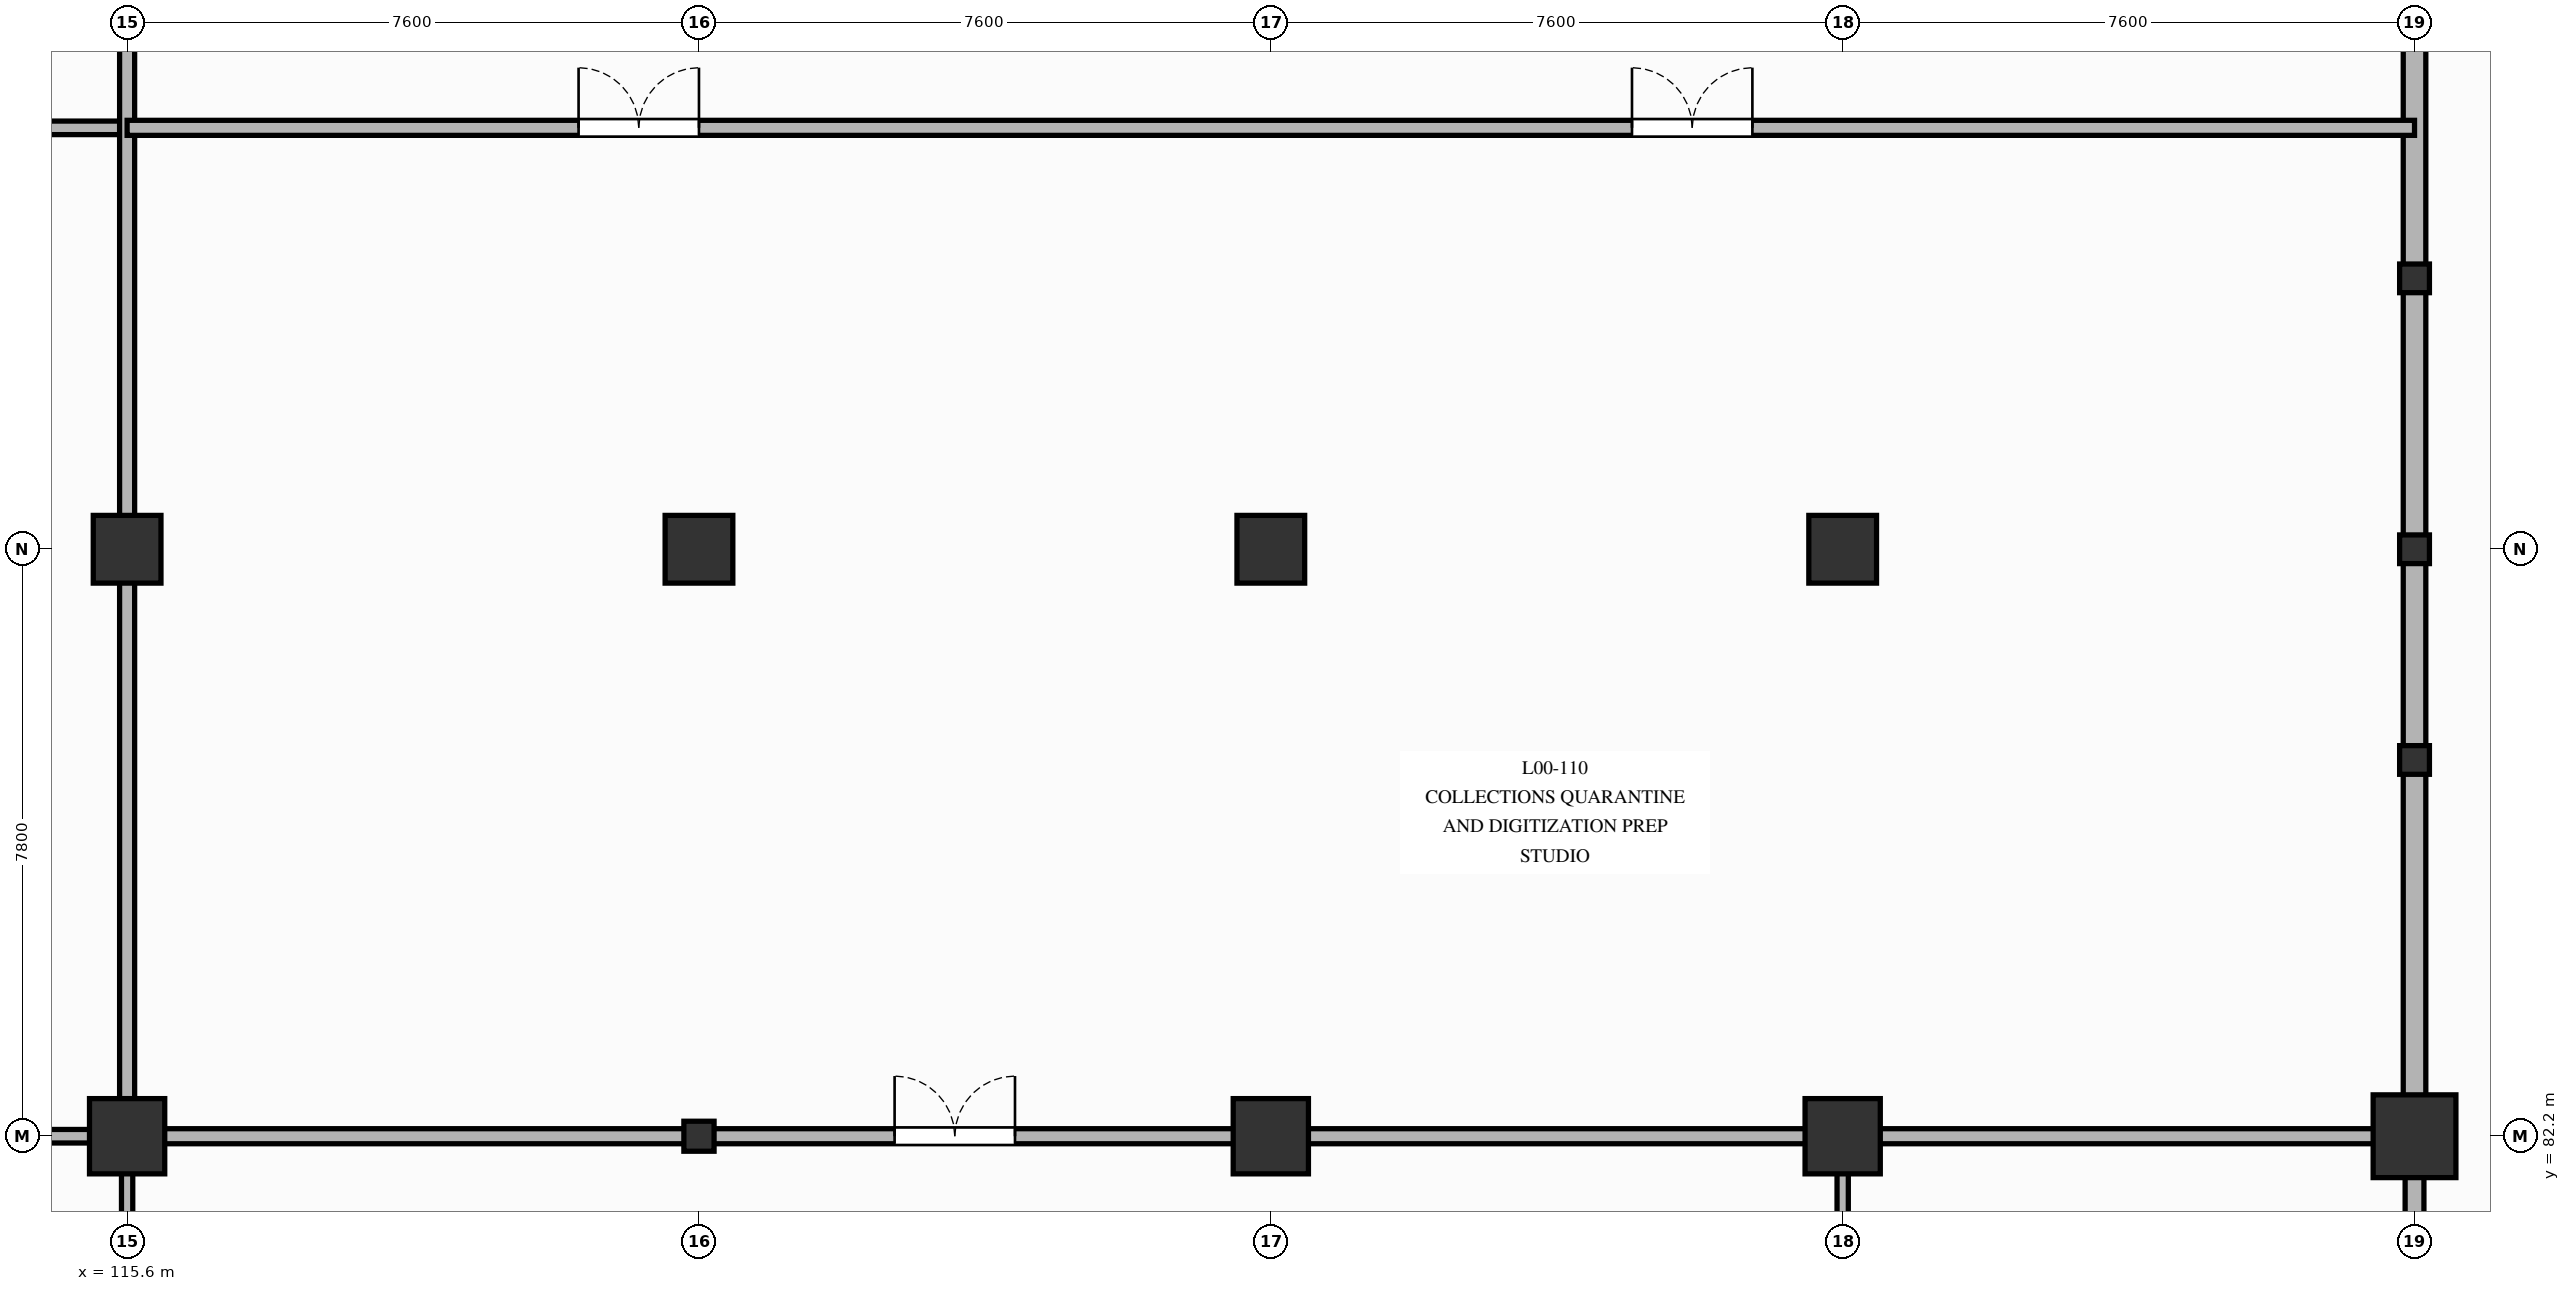
"""IFC4 building model, lengths in metres.
Left out: names, types, materials, properties, quantities, classifications, styles, units other than length and angle.
Written with IfcOpenShell. Run it as: python <this file> out.ifc"""

import sys

from ifc_helpers import new_model, si_unit, direction, frame, frame_2d, origin, origin_2d, place, context, subcontext, project, spatial, rectangle, i_section, extrude, element, fill, save


model = new_model("IFC4")
c1 = context("Model", 3, precision=1e-05, world=origin(), true_north=direction((0.0, 1.0)))
c2 = subcontext(c1, "Body", "Model", "MODEL_VIEW")
j1 = project(units=[si_unit("LENGTHUNIT", "METRE"), si_unit("PLANEANGLEUNIT", "RADIAN")], contexts=[c1])
p1 = place(None, origin())
s1 = spatial("IfcSite", under=j1, at=p1, CompositionType="ELEMENT")
p2 = place(p1, origin())
s2 = spatial("IfcBuilding", under=s1, at=p2, CompositionType="ELEMENT")
p3 = place(p2, origin())
s3 = spatial("IfcBuildingStorey", under=s2, at=p3, CompositionType="ELEMENT", Elevation=0.0)
p4 = place(p3, frame((115.6, 82.2, 0.0), z_axis=(0.0, 0.0, 1.0), x_axis=(1.0, 0.0, 0.0)))
e1 = element("IfcColumn", 1, at=p4, inside=s3, PredefinedType="COLUMN", context=c2, shape_type="SweptSolid", body=[
    extrude(rectangle(XDim=1.0, YDim=1.0, at=origin_2d()), origin(), (0.0, 0.0, 1.0), 5.1),
])
p5 = place(p3, frame((115.6, 90.0, 0.0), z_axis=(0.0, 0.0, 1.0), x_axis=(1.0, 0.0, 0.0)))
e2 = element("IfcColumn", 2, at=p5, inside=s3, PredefinedType="COLUMN", context=c2, shape_type="SweptSolid", body=[
    extrude(rectangle(XDim=0.9, YDim=0.9, at=origin_2d()), origin(), (0.0, 0.0, 1.0), 5.1),
])
p6 = place(p3, frame((123.2, 82.2, 0.0), z_axis=(0.0, 0.0, 1.0), x_axis=(1.0, 0.0, 0.0)))
e3 = element("IfcColumn", 3, at=p6, inside=s3, PredefinedType="COLUMN", context=c2, shape_type="SweptSolid", body=[
    extrude(i_section(OverallWidth=0.401, OverallDepth=0.399, WebThickness=0.025, FlangeThickness=0.04, at=origin_2d()), origin(), (0.0, 0.0, 1.0), 5.1),
])
p7 = place(p3, frame((123.2, 90.0, 0.0), z_axis=(0.0, 0.0, 1.0), x_axis=(1.0, 0.0, 0.0)))
e4 = element("IfcColumn", 4, at=p7, inside=s3, PredefinedType="COLUMN", context=c2, shape_type="SweptSolid", body=[
    extrude(rectangle(XDim=0.9, YDim=0.9, at=origin_2d()), origin(), (0.0, 0.0, 1.0), 5.1),
])
p8 = place(p3, frame((130.8, 82.2, 0.0), z_axis=(0.0, 0.0, 1.0), x_axis=(1.0, 0.0, 0.0)))
e5 = element("IfcColumn", 5, at=p8, inside=s3, PredefinedType="COLUMN", context=c2, shape_type="SweptSolid", body=[
    extrude(rectangle(XDim=1.0, YDim=1.0, at=origin_2d()), origin(), (0.0, 0.0, 1.0), 5.1),
])
p9 = place(p3, frame((130.8, 90.0, 0.0), z_axis=(0.0, 0.0, 1.0), x_axis=(1.0, 0.0, 0.0)))
e6 = element("IfcColumn", 6, at=p9, inside=s3, PredefinedType="COLUMN", context=c2, shape_type="SweptSolid", body=[
    extrude(rectangle(XDim=0.9, YDim=0.9, at=origin_2d()), origin(), (0.0, 0.0, 1.0), 5.1),
])
p10 = place(p3, frame((138.4, 82.2, 0.0), z_axis=(0.0, 0.0, 1.0), x_axis=(1.0, 0.0, 0.0)))
e7 = element("IfcColumn", 7, at=p10, inside=s3, PredefinedType="COLUMN", context=c2, shape_type="SweptSolid", body=[
    extrude(rectangle(XDim=1.0, YDim=1.0, at=origin_2d()), origin(), (0.0, 0.0, 1.0), 5.1),
])
p11 = place(p3, frame((138.4, 90.0, 0.0), z_axis=(0.0, 0.0, 1.0), x_axis=(1.0, 0.0, 0.0)))
e8 = element("IfcColumn", 8, at=p11, inside=s3, PredefinedType="COLUMN", context=c2, shape_type="SweptSolid", body=[
    extrude(rectangle(XDim=0.9, YDim=0.9, at=origin_2d()), origin(), (0.0, 0.0, 1.0), 5.1),
])
p12 = place(p3, frame((146.0, 82.2, 0.0), z_axis=(0.0, 0.0, 1.0), x_axis=(1.0, 0.0, 0.0)))
e9 = element("IfcColumn", 9, at=p12, inside=s3, PredefinedType="COLUMN", context=c2, shape_type="SweptSolid", body=[
    extrude(rectangle(XDim=1.1, YDim=1.1, at=origin_2d()), origin(), (0.0, 0.0, 1.0), 5.1),
])
for number, where, z_axis, x_axis in (
    (10, (146.0, 90.0, 0.0), (0.0, 0.0, 1.0), (1.0, 0.0, 0.0)),
    (11, (146.0, 87.2, 0.0), (0.0, 0.0, 1.0), (1.0, 0.0, 0.0)),
    (12, (146.0, 93.6, 0.0), (0.0, 0.0, 1.0), (1.0, 0.0, 0.0)),
):
    element("IfcColumn", number, at=place(p3, frame(where, z_axis=z_axis, x_axis=x_axis)), inside=s3, PredefinedType="COLUMN", context=c2, shape_type="SweptSolid", body=[
        extrude(i_section(OverallWidth=0.396, OverallDepth=0.381, WebThickness=0.019, FlangeThickness=0.03, at=origin_2d()), origin(), (0.0, 0.0, 1.0), 5.1),
    ])
p13 = place(p3, frame((146.0, 82.2, 0.0), z_axis=(0.0, 0.0, 1.0), x_axis=(0.0, 1.0, 0.0)))
e13 = element("IfcWall", 13, at=p13, inside=s3, PredefinedType="SOLIDWALL", context=c2, shape_type="SweptSolid", body=[
    extrude(rectangle(XDim=31.8, YDim=0.3, at=frame_2d((15.9, 0.0))), origin(), (0.0, 0.0, 1.0), 4.145),
])
p14 = place(p13, frame((24.45, 0.0, 0.0)))
e14 = element("IfcOpeningElement", 14, at=p14, cuts=e13, PredefinedType="OPENING", context=c2, shape_type="SweptSolid", body=[
    extrude(rectangle(XDim=3.2, YDim=3.6, at=frame_2d((1.6, 1.8))), frame((0.0, 0.16, 0.0), z_axis=(0.0, -1.0, 0.0), x_axis=(1.0, 0.0, 0.0)), (0.0, 0.0, 1.0), 0.32),
])
p15 = place(p13, frame((28.0, 0.0, 0.0)))
e15 = element("IfcOpeningElement", 15, at=p15, cuts=e13, PredefinedType="OPENING", context=c2, shape_type="SweptSolid", body=[
    extrude(rectangle(XDim=3.2, YDim=3.6, at=frame_2d((1.6, 1.8))), frame((0.0, 0.16, 0.0), z_axis=(0.0, -1.0, 0.0), x_axis=(1.0, 0.0, 0.0)), (0.0, 0.0, 1.0), 0.32),
])
p16 = place(p3, frame((111.4, 95.6, 0.0), z_axis=(0.0, 0.0, 1.0), x_axis=(1.0, 0.0, 0.0)))
e16 = element("IfcWall", 16, at=p16, inside=s3, PredefinedType="PLUMBINGWALL", context=c2, shape_type="SweptSolid", body=[
    extrude(rectangle(XDim=4.2, YDim=0.18, at=frame_2d((2.1, 0.0))), origin(), (0.0, 0.0, 1.0), 4.8),
])
p17 = place(p16, frame((1.625, 0.0, 0.0)))
e17 = element("IfcOpeningElement", 17, at=p17, cuts=e16, PredefinedType="OPENING", context=c2, shape_type="SweptSolid", body=[
    extrude(rectangle(XDim=0.95, YDim=2.15, at=frame_2d((0.475, 1.075))), frame((0.0, 0.1, 0.0), z_axis=(0.0, -1.0, 0.0), x_axis=(1.0, 0.0, 0.0)), (0.0, 0.0, 1.0), 0.2),
])
p18 = place(p3, frame((115.6, 82.2, 0.0), z_axis=(0.0, 0.0, 1.0), x_axis=(0.0, 1.0, 0.0)))
e18 = element("IfcWall", 18, at=p18, inside=s3, PredefinedType="PARTITIONING", context=c2, shape_type="SweptSolid", body=[
    extrude(rectangle(XDim=31.8, YDim=0.2, at=frame_2d((15.9, 0.0))), origin(), (0.0, 0.0, 1.0), 4.045),
])
p19 = place(p18, frame((18.0, 0.0, 0.0)))
e19 = element("IfcOpeningElement", 19, at=p19, cuts=e18, PredefinedType="OPENING", context=c2, shape_type="SweptSolid", body=[
    extrude(rectangle(XDim=1.6, YDim=2.2, at=frame_2d((0.8, 1.1))), frame((0.0, 0.11, 0.0), z_axis=(0.0, -1.0, 0.0), x_axis=(1.0, 0.0, 0.0)), (0.0, 0.0, 1.0), 0.22),
])
p20 = place(p3, frame((115.6, 95.6, 0.0), z_axis=(0.0, 0.0, 1.0), x_axis=(1.0, 0.0, 0.0)))
e20 = element("IfcWall", 20, at=p20, inside=s3, PredefinedType="PARTITIONING", context=c2, shape_type="SweptSolid", body=[
    extrude(rectangle(XDim=30.4, YDim=0.2, at=frame_2d((15.2, 0.0))), origin(), (0.0, 0.0, 1.0), 4.045),
])
p21 = place(p20, frame((6.0, 0.0, 0.0)))
e21 = element("IfcOpeningElement", 21, at=p21, cuts=e20, PredefinedType="OPENING", context=c2, shape_type="SweptSolid", body=[
    extrude(rectangle(XDim=1.6, YDim=2.2, at=frame_2d((0.8, 1.1))), frame((0.0, 0.11, 0.0), z_axis=(0.0, -1.0, 0.0), x_axis=(1.0, 0.0, 0.0)), (0.0, 0.0, 1.0), 0.22),
])
p22 = place(p20, frame((20.0, 0.0, 0.0)))
e22 = element("IfcOpeningElement", 22, at=p22, cuts=e20, PredefinedType="OPENING", context=c2, shape_type="SweptSolid", body=[
    extrude(rectangle(XDim=1.6, YDim=2.2, at=frame_2d((0.8, 1.1))), frame((0.0, 0.11, 0.0), z_axis=(0.0, -1.0, 0.0), x_axis=(1.0, 0.0, 0.0)), (0.0, 0.0, 1.0), 0.22),
])
for number, where, z_axis, x_axis in (
    (23, (115.6, 66.6, 0.0), (0.0, 0.0, 1.0), (0.0, 1.0, 0.0)),
    (24, (138.4, 66.6, 0.0), (0.0, 0.0, 1.0), (0.0, 1.0, 0.0)),
):
    element("IfcWall", number, at=place(p3, frame(where, z_axis=z_axis, x_axis=x_axis)), inside=s3, PredefinedType="PARTITIONING", context=c2, shape_type="SweptSolid", body=[
        extrude(rectangle(XDim=15.6, YDim=0.15, at=frame_2d((7.8, 0.0))), origin(), (0.0, 0.0, 1.0), 4.163),
    ])
p23 = place(p3, frame((146.0, 74.4, 0.0), z_axis=(0.0, 0.0, 1.0), x_axis=(0.0, 1.0, 0.0)))
e25 = element("IfcWall", 25, at=p23, inside=s3, PredefinedType="PARTITIONING", context=c2, shape_type="SweptSolid", body=[
    extrude(rectangle(XDim=7.8, YDim=0.25, at=frame_2d((3.9, 0.0))), origin(), (0.0, 0.0, 1.0), 4.308),
])
p24 = place(p23, frame((1.2, 0.0, 0.0)))
e26 = element("IfcOpeningElement", 26, at=p24, cuts=e25, PredefinedType="OPENING", context=c2, shape_type="SweptSolid", body=[
    extrude(rectangle(XDim=1.8, YDim=2.3, at=frame_2d((0.9, 1.15))), frame((0.0, 0.135, 0.0), z_axis=(0.0, -1.0, 0.0), x_axis=(1.0, 0.0, 0.0)), (0.0, 0.0, 1.0), 0.27),
])
p25 = place(p23, frame((3.6, 0.0, 0.0)))
e27 = element("IfcOpeningElement", 27, at=p25, cuts=e25, PredefinedType="OPENING", context=c2, shape_type="SweptSolid", body=[
    extrude(rectangle(XDim=1.8, YDim=2.3, at=frame_2d((0.9, 1.15))), frame((0.0, 0.135, 0.0), z_axis=(0.0, -1.0, 0.0), x_axis=(1.0, 0.0, 0.0)), (0.0, 0.0, 1.0), 0.27),
])
p26 = place(p3, frame((99.0, 82.2, 0.0), z_axis=(0.0, 0.0, 1.0), x_axis=(1.0, 0.0, 0.0)))
e28 = element("IfcWall", 28, at=p26, inside=s3, PredefinedType="PLUMBINGWALL", context=c2, shape_type="SweptSolid", body=[
    extrude(rectangle(XDim=16.6, YDim=0.18, at=frame_2d((8.3, 0.0))), origin(), (0.0, 0.0, 1.0), 4.153),
])
p27 = place(p3, frame((115.6, 82.2, 0.0), z_axis=(0.0, 0.0, 1.0), x_axis=(1.0, 0.0, 0.0)))
e29 = element("IfcWall", 29, at=p27, inside=s3, PredefinedType="PARTITIONING", context=c2, shape_type="SweptSolid", body=[
    extrude(rectangle(XDim=30.4, YDim=0.2, at=frame_2d((15.2, 0.0))), origin(), (0.0, 0.0, 1.0), 4.308),
])
p28 = place(p27, frame((10.2, 0.0, 0.0)))
e30 = element("IfcOpeningElement", 30, at=p28, cuts=e29, PredefinedType="OPENING", context=c2, shape_type="SweptSolid", body=[
    extrude(rectangle(XDim=1.6, YDim=2.2, at=frame_2d((0.8, 1.1))), frame((0.0, 0.11, 0.0), z_axis=(0.0, -1.0, 0.0), x_axis=(1.0, 0.0, 0.0)), (0.0, 0.0, 1.0), 0.22),
])
p29 = place(p21, origin())
e31 = element("IfcDoor", 31, at=p29, inside=s3, OperationType="DOUBLE_DOOR_SINGLE_SWING", PredefinedType="DOOR", context=c2, shape_type="SweptSolid", body=[
    extrude(rectangle(XDim=1.6, YDim=2.2, at=frame_2d((0.8, 1.1))), frame((0.0, 0.025, 0.0), z_axis=(0.0, -1.0, 0.0), x_axis=(1.0, 0.0, 0.0)), (0.0, 0.0, 1.0), 0.05),
])
fill(e21, e31)
p30 = place(p22, origin())
e32 = element("IfcDoor", 32, at=p30, inside=s3, OperationType="DOUBLE_DOOR_SINGLE_SWING", PredefinedType="DOOR", context=c2, shape_type="SweptSolid", body=[
    extrude(rectangle(XDim=1.6, YDim=2.2, at=frame_2d((0.8, 1.1))), frame((0.0, 0.025, 0.0), z_axis=(0.0, -1.0, 0.0), x_axis=(1.0, 0.0, 0.0)), (0.0, 0.0, 1.0), 0.05),
])
fill(e22, e32)
p31 = place(p28, origin())
e33 = element("IfcDoor", 33, at=p31, inside=s3, OperationType="DOUBLE_DOOR_SINGLE_SWING", PredefinedType="DOOR", context=c2, shape_type="SweptSolid", body=[
    extrude(rectangle(XDim=1.6, YDim=2.2, at=frame_2d((0.8, 1.1))), frame((0.0, 0.025, 0.0), z_axis=(0.0, -1.0, 0.0), x_axis=(1.0, 0.0, 0.0)), (0.0, 0.0, 1.0), 0.05),
])
fill(e30, e33)
save(model, sys.argv[1])
